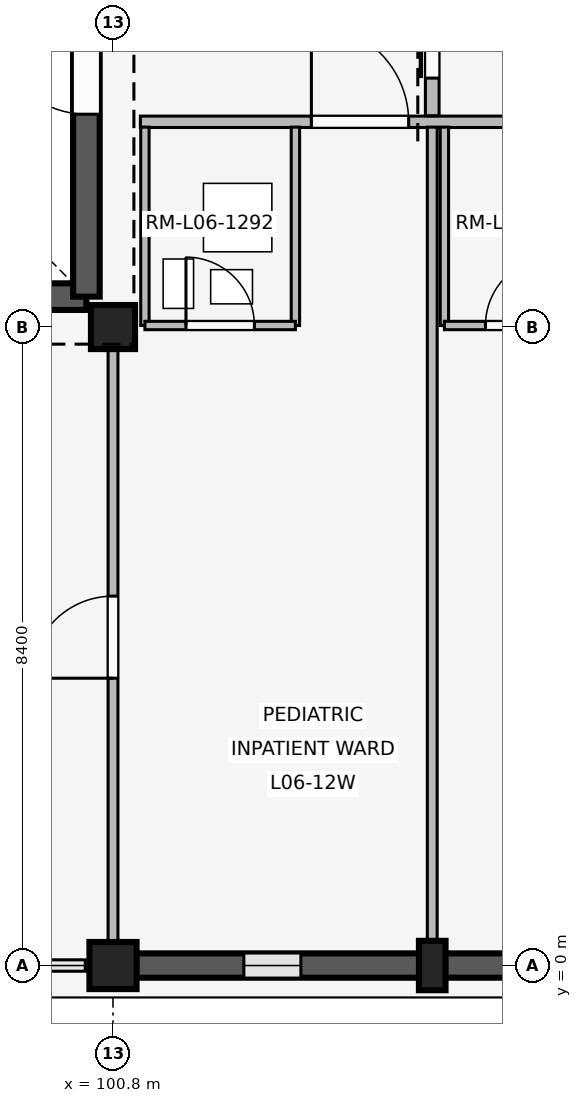
"""IFC4 building model, lengths in metres.
Left out: names, types, materials, properties, quantities, classifications, styles, units other than length and angle.
Written with IfcOpenShell. Run it as: python <this file> out.ifc"""

import sys

from ifc_helpers import new_model, si_unit, direction, frame, frame_2d, origin, origin_2d, place, context, subcontext, project, spatial, rectangle, extrude, element, fill, save


model = new_model("IFC4")
c1 = context("Model", 3, precision=1e-05, world=origin(), true_north=direction((0.0, 1.0)))
c2 = subcontext(c1, "Body", "Model", "MODEL_VIEW")
j1 = project(units=[si_unit("LENGTHUNIT", "METRE"), si_unit("PLANEANGLEUNIT", "RADIAN")], contexts=[c1])
p1 = place(None, origin())
s1 = spatial("IfcSite", under=j1, at=p1, CompositionType="ELEMENT")
p2 = place(p1, origin())
s2 = spatial("IfcBuilding", under=s1, at=p2, CompositionType="ELEMENT")
p3 = place(p2, frame((0.0, 0.0, 24.6)))
s3 = spatial("IfcBuildingStorey", under=s2, at=p3, CompositionType="ELEMENT", Elevation=24.6)
p4 = place(p3, frame((100.8, 0.0, 0.0), z_axis=(0.0, 0.0, 1.0), x_axis=(1.0, 0.0, 0.0)))
e1 = element("IfcColumn", 1, at=p4, inside=s3, PredefinedType="COLUMN", context=c2, shape_type="SweptSolid", body=[
    extrude(rectangle(XDim=0.62, YDim=0.62, at=origin_2d()), origin(), (0.0, 0.0, 1.0), 4.2),
])
p5 = place(p3, frame((100.8, 8.4, 0.0), z_axis=(0.0, 0.0, 1.0), x_axis=(1.0, 0.0, 0.0)))
e2 = element("IfcColumn", 2, at=p5, inside=s3, PredefinedType="COLUMN", context=c2, shape_type="SweptSolid", body=[
    extrude(rectangle(XDim=0.58, YDim=0.58, at=origin_2d()), origin(), (0.0, 0.0, 1.0), 4.2),
])
p6 = place(p3, frame((105.0, 0.0, 0.0), z_axis=(0.0, 0.0, 1.0), x_axis=(1.0, 0.0, 0.0)))
e3 = element("IfcColumn", 3, at=p6, inside=s3, PredefinedType="PILASTER", context=c2, shape_type="SweptSolid", body=[
    extrude(rectangle(XDim=0.35, YDim=0.65, at=origin_2d()), origin(), (0.0, 0.0, 1.0), 4.2),
])
p7 = place(p3, frame((108.895, 0.0, 0.0), z_axis=(0.0, 0.0, 1.0), x_axis=(-1.0, 0.0, 0.0)))
e4 = element("IfcWall", 4, at=p7, inside=s3, PredefinedType="SOLIDWALL", context=c2, shape_type="SweptSolid", body=[
    extrude(rectangle(XDim=7.79, YDim=0.32, at=frame_2d((3.895, 0.0))), origin(), (0.0, 0.0, 1.0), 3.34),
])
p8 = place(p7, frame((1.417, 0.0, 0.85)))
e5 = element("IfcOpeningElement", 5, at=p8, cuts=e4, PredefinedType="OPENING", context=c2, shape_type="SweptSolid", body=[
    extrude(rectangle(XDim=0.75, YDim=1.85, at=frame_2d((0.375, 0.925))), frame((0.0, 0.17, 0.0), z_axis=(0.0, -1.0, 0.0), x_axis=(1.0, 0.0, 0.0)), (0.0, 0.0, 1.0), 0.34),
])
p9 = place(p7, frame((5.623, 0.0, 0.85)))
e6 = element("IfcOpeningElement", 6, at=p9, cuts=e4, PredefinedType="OPENING", context=c2, shape_type="SweptSolid", body=[
    extrude(rectangle(XDim=0.75, YDim=1.85, at=frame_2d((0.375, 0.925))), frame((0.0, 0.17, 0.0), z_axis=(0.0, -1.0, 0.0), x_axis=(1.0, 0.0, 0.0)), (0.0, 0.0, 1.0), 0.34),
])
p10 = place(p3, frame((92.95, 8.8, 0.0), z_axis=(0.0, 0.0, 1.0), x_axis=(1.0, 0.0, 0.0)))
e7 = element("IfcWall", 7, at=p10, inside=s3, PredefinedType="SHEAR", context=c2, shape_type="SweptSolid", body=[
    extrude(rectangle(XDim=7.5, YDim=0.35, at=frame_2d((3.75, 0.0))), origin(), (0.0, 0.0, 1.0), 3.92),
])
p11 = place(p10, frame((4.85, 0.0, 0.0)))
e8 = element("IfcOpeningElement", 8, at=p11, cuts=e7, PredefinedType="OPENING", context=c2, shape_type="SweptSolid", body=[
    extrude(rectangle(XDim=1.2, YDim=2.2, at=frame_2d((0.6, 1.1))), frame((0.0, 0.185, 0.0), z_axis=(0.0, -1.0, 0.0), x_axis=(1.0, 0.0, 0.0)), (0.0, 0.0, 1.0), 0.37),
])
p12 = place(p3, frame((100.45, 8.8, 0.0), z_axis=(0.0, 0.0, 1.0), x_axis=(0.0, 1.0, 0.0)))
e9 = element("IfcWall", 9, at=p12, inside=s3, PredefinedType="SHEAR", context=c2, shape_type="SweptSolid", body=[
    extrude(rectangle(XDim=7.55, YDim=0.35, at=frame_2d((3.775, 0.0))), origin(), (0.0, 0.0, 1.0), 3.92),
])
p13 = place(p12, frame((2.4, 0.0, 0.0)))
e10 = element("IfcOpeningElement", 10, at=p13, cuts=e9, PredefinedType="OPENING", context=c2, shape_type="SweptSolid", body=[
    extrude(rectangle(XDim=1.2, YDim=2.2, at=frame_2d((0.6, 1.1))), frame((0.0, 0.185, 0.0), z_axis=(0.0, -1.0, 0.0), x_axis=(1.0, 0.0, 0.0)), (0.0, 0.0, 1.0), 0.37),
])
p14 = place(p3, frame((100.8, 0.14, 0.0), z_axis=(0.0, 0.0, 1.0), x_axis=(0.0, 1.0, 0.0)))
e11 = element("IfcWall", 11, at=p14, inside=s3, PredefinedType="PARTITIONING", context=c2, shape_type="SweptSolid", body=[
    extrude(rectangle(XDim=8.21, YDim=0.13, at=frame_2d((4.105, 0.0))), origin(), (0.0, 0.0, 1.0), 3.32),
])
p15 = place(p14, frame((3.64, 0.0, 0.0)))
e12 = element("IfcOpeningElement", 12, at=p15, cuts=e11, PredefinedType="OPENING", context=c2, shape_type="SweptSolid", body=[
    extrude(rectangle(XDim=1.08, YDim=2.15, at=frame_2d((0.54, 1.075))), frame((0.0, 0.075, 0.0), z_axis=(0.0, -1.0, 0.0), x_axis=(1.0, 0.0, 0.0)), (0.0, 0.0, 1.0), 0.15),
])
p16 = place(p3, frame((101.16, 11.1, 0.0), z_axis=(0.0, 0.0, 1.0), x_axis=(1.0, 0.0, 0.0)))
e13 = element("IfcWall", 13, at=p16, inside=s3, PredefinedType="PARTITIONING", context=c2, shape_type="SweptSolid", body=[
    extrude(rectangle(XDim=7.96, YDim=0.15, at=frame_2d((3.98, 0.0))), origin(), (0.0, 0.0, 1.0), 3.32),
])
p17 = place(p16, frame((2.25, 0.0, 0.0)))
e14 = element("IfcOpeningElement", 14, at=p17, cuts=e13, PredefinedType="OPENING", context=c2, shape_type="SweptSolid", body=[
    extrude(rectangle(XDim=1.28, YDim=2.2, at=frame_2d((0.64, 1.1))), frame((0.0, 0.085, 0.0), z_axis=(0.0, -1.0, 0.0), x_axis=(1.0, 0.0, 0.0)), (0.0, 0.0, 1.0), 0.17),
])
p18 = place(p16, frame((5.95, 0.0, 0.0)))
e15 = element("IfcOpeningElement", 15, at=p18, cuts=e13, PredefinedType="OPENING", context=c2, shape_type="SweptSolid", body=[
    extrude(rectangle(XDim=1.28, YDim=2.2, at=frame_2d((0.64, 1.1))), frame((0.0, 0.085, 0.0), z_axis=(0.0, -1.0, 0.0), x_axis=(1.0, 0.0, 0.0)), (0.0, 0.0, 1.0), 0.17),
])
p19 = place(p3, frame((105.0, 0.1, 0.0), z_axis=(0.0, 0.0, 1.0), x_axis=(0.0, 1.0, 0.0)))
e16 = element("IfcWall", 16, at=p19, inside=s3, PredefinedType="PARTITIONING", context=c2, shape_type="SweptSolid", body=[
    extrude(rectangle(XDim=10.93, YDim=0.13, at=frame_2d((5.465, 0.0))), origin(), (0.0, 0.0, 1.0), 3.32),
])
for number, where, z_axis, x_axis in (
    (17, (101.22, 8.42, 0.0), (0.0, 0.0, 1.0), (0.0, 1.0, 0.0)),
    (18, (103.2, 8.42, 0.0), (0.0, 0.0, 1.0), (0.0, 1.0, 0.0)),
):
    element("IfcWall", number, at=place(p3, frame(where, z_axis=z_axis, x_axis=x_axis)), inside=s3, PredefinedType="PARTITIONING", context=c2, shape_type="SweptSolid", body=[
        extrude(rectangle(XDim=2.61, YDim=0.11, at=frame_2d((1.305, 0.0))), origin(), (0.0, 0.0, 1.0), 3.32),
    ])
p20 = place(p3, frame((101.22, 8.42, 0.0), z_axis=(0.0, 0.0, 1.0), x_axis=(1.0, 0.0, 0.0)))
e19 = element("IfcWall", 19, at=p20, inside=s3, PredefinedType="PARTITIONING", context=c2, shape_type="SweptSolid", body=[
    extrude(rectangle(XDim=1.98, YDim=0.11, at=frame_2d((0.99, 0.0))), origin(), (0.0, 0.0, 1.0), 3.32),
])
p21 = place(p20, frame((0.54, 0.0, 0.0)))
e20 = element("IfcOpeningElement", 20, at=p21, cuts=e19, PredefinedType="OPENING", context=c2, shape_type="SweptSolid", body=[
    extrude(rectangle(XDim=0.9, YDim=2.1, at=frame_2d((0.45, 1.05))), frame((0.0, 0.065, 0.0), z_axis=(0.0, -1.0, 0.0), x_axis=(1.0, 0.0, 0.0)), (0.0, 0.0, 1.0), 0.13),
])
p22 = place(p3, frame((105.16, 8.42, 0.0), z_axis=(0.0, 0.0, 1.0), x_axis=(0.0, 1.0, 0.0)))
e21 = element("IfcWall", 21, at=p22, inside=s3, PredefinedType="PARTITIONING", context=c2, shape_type="SweptSolid", body=[
    extrude(rectangle(XDim=2.61, YDim=0.11, at=frame_2d((1.305, 0.0))), origin(), (0.0, 0.0, 1.0), 3.32),
])
p23 = place(p3, frame((105.16, 8.42, 0.0), z_axis=(0.0, 0.0, 1.0), x_axis=(1.0, 0.0, 0.0)))
e22 = element("IfcWall", 22, at=p23, inside=s3, PredefinedType="PARTITIONING", context=c2, shape_type="SweptSolid", body=[
    extrude(rectangle(XDim=1.98, YDim=0.11, at=frame_2d((0.99, 0.0))), origin(), (0.0, 0.0, 1.0), 3.32),
])
p24 = place(p23, frame((0.54, 0.0, 0.0)))
e23 = element("IfcOpeningElement", 23, at=p24, cuts=e22, PredefinedType="OPENING", context=c2, shape_type="SweptSolid", body=[
    extrude(rectangle(XDim=0.9, YDim=2.1, at=frame_2d((0.45, 1.05))), frame((0.0, 0.065, 0.0), z_axis=(0.0, -1.0, 0.0), x_axis=(1.0, 0.0, 0.0)), (0.0, 0.0, 1.0), 0.13),
])
p25 = place(p3, frame((105.0, 11.18, 0.0), z_axis=(0.0, 0.0, 1.0), x_axis=(0.0, 1.0, 0.0)))
e24 = element("IfcWall", 24, at=p25, inside=s3, PredefinedType="PARTITIONING", context=c2, shape_type="SweptSolid", body=[
    extrude(rectangle(XDim=2.84, YDim=0.18, at=frame_2d((1.42, 0.0))), origin(), (0.0, 0.0, 1.0), 3.32),
])
p26 = place(p25, frame((0.495, 0.0, 0.0)))
e25 = element("IfcOpeningElement", 25, at=p26, cuts=e24, PredefinedType="OPENING", context=c2, shape_type="SweptSolid", body=[
    extrude(rectangle(XDim=1.85, YDim=2.3, at=frame_2d((0.925, 1.15))), frame((0.0, 0.1, 0.0), z_axis=(0.0, -1.0, 0.0), x_axis=(1.0, 0.0, 0.0)), (0.0, 0.0, 1.0), 0.2),
])
p27 = place(p9, origin())
e26 = element("IfcWindow", 26, at=p27, inside=s3, PartitioningType="SINGLE_PANEL", PredefinedType="WINDOW", context=c2, shape_type="SweptSolid", body=[
    extrude(rectangle(XDim=0.75, YDim=1.85, at=frame_2d((0.375, 0.925))), frame((0.0, 0.03, 0.0), z_axis=(0.0, -1.0, 0.0), x_axis=(1.0, 0.0, 0.0)), (0.0, 0.0, 1.0), 0.06),
])
fill(e6, e26)
p28 = place(p13, origin())
e27 = element("IfcDoor", 27, at=p28, inside=s3, OperationType="SINGLE_SWING_RIGHT", PredefinedType="DOOR", context=c2, shape_type="SweptSolid", body=[
    extrude(rectangle(XDim=1.2, YDim=2.2, at=frame_2d((0.6, 1.1))), frame((0.0, 0.025, 0.0), z_axis=(0.0, -1.0, 0.0), x_axis=(1.0, 0.0, 0.0)), (0.0, 0.0, 1.0), 0.05),
])
fill(e10, e27)
p29 = place(p15, origin())
e28 = element("IfcDoor", 28, at=p29, inside=s3, OperationType="SINGLE_SWING_LEFT", PredefinedType="DOOR", context=c2, shape_type="SweptSolid", body=[
    extrude(rectangle(XDim=1.08, YDim=2.15, at=frame_2d((0.54, 1.075))), frame((0.0, 0.025, 0.0), z_axis=(0.0, -1.0, 0.0), x_axis=(1.0, 0.0, 0.0)), (0.0, 0.0, 1.0), 0.05),
])
fill(e12, e28)
p30 = place(p17, origin())
e29 = element("IfcDoor", 29, at=p30, inside=s3, OperationType="SINGLE_SWING_LEFT", PredefinedType="DOOR", context=c2, shape_type="SweptSolid", body=[
    extrude(rectangle(XDim=1.28, YDim=2.2, at=frame_2d((0.64, 1.1))), frame((0.0, 0.025, 0.0), z_axis=(0.0, -1.0, 0.0), x_axis=(1.0, 0.0, 0.0)), (0.0, 0.0, 1.0), 0.05),
])
fill(e14, e29)
p31 = place(p21, origin())
e30 = element("IfcDoor", 30, at=p31, inside=s3, OperationType="SINGLE_SWING_LEFT", PredefinedType="DOOR", context=c2, shape_type="SweptSolid", body=[
    extrude(rectangle(XDim=0.9, YDim=2.1, at=frame_2d((0.45, 1.05))), frame((0.0, 0.025, 0.0), z_axis=(0.0, -1.0, 0.0), x_axis=(1.0, 0.0, 0.0)), (0.0, 0.0, 1.0), 0.05),
])
fill(e20, e30)
p32 = place(p24, origin())
e31 = element("IfcDoor", 31, at=p32, inside=s3, OperationType="SINGLE_SWING_RIGHT", PredefinedType="DOOR", context=c2, shape_type="SweptSolid", body=[
    extrude(rectangle(XDim=0.9, YDim=2.1, at=frame_2d((0.45, 1.05))), frame((0.0, 0.025, 0.0), z_axis=(0.0, -1.0, 0.0), x_axis=(1.0, 0.0, 0.0)), (0.0, 0.0, 1.0), 0.05),
])
fill(e23, e31)
p33 = place(p26, origin())
e32 = element("IfcDoor", 32, at=p33, inside=s3, OperationType="SLIDING_TO_LEFT", PredefinedType="DOOR", context=c2, shape_type="SweptSolid", body=[
    extrude(rectangle(XDim=1.85, YDim=2.3, at=frame_2d((0.925, 1.15))), frame((0.0, 0.025, 0.0), z_axis=(0.0, -1.0, 0.0), x_axis=(1.0, 0.0, 0.0)), (0.0, 0.0, 1.0), 0.05),
])
fill(e25, e32)
save(model, sys.argv[1])
